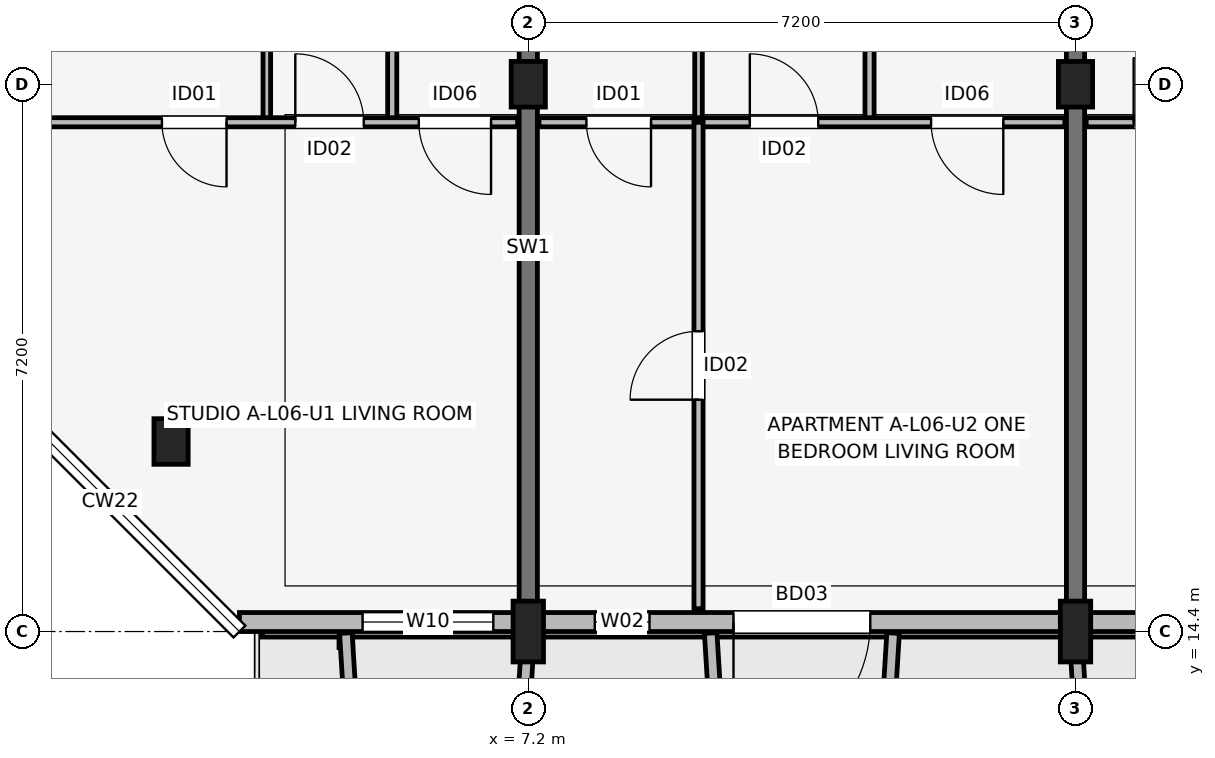
"""IFC4 building model, lengths in metres.
Left out: names, types, materials, properties, quantities, classifications, styles, units other than length and angle.
Written with IfcOpenShell. Run it as: python <this file> out.ifc"""

import sys

from ifc_helpers import new_model, si_unit, direction, frame, frame_2d, origin, origin_2d, place, context, subcontext, project, spatial, rectangle, extrude, element, fill, save


model = new_model("IFC4")
c1 = context("Model", 3, precision=1e-05, world=origin(), true_north=direction((0.0, 1.0)))
c2 = subcontext(c1, "Body", "Model", "MODEL_VIEW")
j1 = project(units=[si_unit("LENGTHUNIT", "METRE"), si_unit("PLANEANGLEUNIT", "RADIAN")], contexts=[c1])
p1 = place(None, origin())
s1 = spatial("IfcSite", under=j1, at=p1, CompositionType="ELEMENT")
p2 = place(p1, origin())
s2 = spatial("IfcBuilding", under=s1, at=p2, CompositionType="ELEMENT")
p3 = place(p2, frame((0.0, 0.0, 21.3)))
s3 = spatial("IfcBuildingStorey", under=s2, at=p3, CompositionType="ELEMENT", Elevation=21.3)
p4 = place(p3, frame((2.5, 16.9, 0.0), z_axis=(0.0, 0.0, 1.0), x_axis=(1.0, 0.0, 0.0)))
e1 = element("IfcColumn", 1, at=p4, inside=s3, PredefinedType="COLUMN", context=c2, shape_type="SweptSolid", body=[
    extrude(rectangle(XDim=0.45, YDim=0.6, at=origin_2d()), origin(), (0.0, 0.0, 1.0), 3.15),
])
p5 = place(p3, frame((7.2, 14.4, 0.0), z_axis=(0.0, 0.0, 1.0), x_axis=(1.0, 0.0, 0.0)))
e2 = element("IfcColumn", 2, at=p5, inside=s3, PredefinedType="COLUMN", context=c2, shape_type="SweptSolid", body=[
    extrude(rectangle(XDim=0.4, YDim=0.8, at=origin_2d()), origin(), (0.0, 0.0, 1.0), 3.15),
])
p6 = place(p3, frame((7.2, 21.6, 0.0), z_axis=(0.0, 0.0, 1.0), x_axis=(1.0, 0.0, 0.0)))
e3 = element("IfcColumn", 3, at=p6, inside=s3, PredefinedType="COLUMN", context=c2, shape_type="SweptSolid", body=[
    extrude(rectangle(XDim=0.45, YDim=0.6, at=origin_2d()), origin(), (0.0, 0.0, 1.0), 3.15),
])
p7 = place(p3, frame((14.4, 14.4, 0.0), z_axis=(0.0, 0.0, 1.0), x_axis=(1.0, 0.0, 0.0)))
e4 = element("IfcColumn", 4, at=p7, inside=s3, PredefinedType="COLUMN", context=c2, shape_type="SweptSolid", body=[
    extrude(rectangle(XDim=0.4, YDim=0.8, at=origin_2d()), origin(), (0.0, 0.0, 1.0), 3.15),
])
p8 = place(p3, frame((14.4, 21.6, 0.0), z_axis=(0.0, 0.0, 1.0), x_axis=(1.0, 0.0, 0.0)))
e5 = element("IfcColumn", 5, at=p8, inside=s3, PredefinedType="COLUMN", context=c2, shape_type="SweptSolid", body=[
    extrude(rectangle(XDim=0.45, YDim=0.6, at=origin_2d()), origin(), (0.0, 0.0, 1.0), 3.15),
])
for number, where, z_axis, x_axis in (
    (6, (7.2, 14.75, 0.0), (0.0, 0.0, 1.0), (0.0, 1.0, 0.0)),
    (7, (14.4, 14.75, 0.0), (0.0, 0.0, 1.0), (0.0, 1.0, 0.0)),
):
    element("IfcWall", number, at=place(p3, frame(where, z_axis=z_axis, x_axis=x_axis)), inside=s3, PredefinedType="SHEAR", context=c2, shape_type="SweptSolid", body=[
        extrude(rectangle(XDim=9.4, YDim=0.24, at=frame_2d((4.7, 0.0))), origin(), (0.0, 0.0, 1.0), 3.15),
    ])
p9 = place(p3, frame((3.4, 14.525, 0.0), z_axis=(0.0, 0.0, 1.0), x_axis=(1.0, 0.0, 0.0)))
e8 = element("IfcWall", 8, at=p9, inside=s3, PredefinedType="SOLIDWALL", context=c2, shape_type="SweptSolid", body=[
    extrude(rectangle(XDim=29.2, YDim=0.25, at=frame_2d((14.6, 0.0))), origin(), (0.0, 0.0, 1.0), 2.43),
])
p10 = place(p9, frame((8.3, 0.0, 0.0), z_axis=(0.0, 0.0, 1.0), x_axis=(-1.0, 0.0, 0.0)))
e9 = element("IfcOpeningElement", 9, at=p10, cuts=e8, PredefinedType="OPENING", context=c2, shape_type="SweptSolid", body=[
    extrude(rectangle(XDim=1.8, YDim=2.15, at=frame_2d((0.9, 1.075))), frame((0.0, 0.135, 0.0), z_axis=(0.0, -1.0, 0.0), x_axis=(1.0, 0.0, 0.0)), (0.0, 0.0, 1.0), 0.27),
])
p11 = place(p9, frame((22.625, 0.0, 0.0), z_axis=(0.0, 0.0, 1.0), x_axis=(-1.0, 0.0, 0.0)))
e10 = element("IfcOpeningElement", 10, at=p11, cuts=e8, PredefinedType="OPENING", context=c2, shape_type="SweptSolid", body=[
    extrude(rectangle(XDim=1.65, YDim=2.15, at=frame_2d((0.825, 1.075))), frame((0.0, 0.135, 0.0), z_axis=(0.0, -1.0, 0.0), x_axis=(1.0, 0.0, 0.0)), (0.0, 0.0, 1.0), 0.27),
])
p12 = place(p9, frame((1.62, 0.0, 0.7)))
e11 = element("IfcOpeningElement", 11, at=p12, cuts=e8, PredefinedType="OPENING", context=c2, shape_type="SweptSolid", body=[
    extrude(rectangle(XDim=1.72, YDim=1.6, at=frame_2d((0.86, 0.8))), frame((0.0, 0.135, 0.0), z_axis=(0.0, -1.0, 0.0), x_axis=(1.0, 0.0, 0.0)), (0.0, 0.0, 1.0), 0.27),
])
p13 = place(p9, frame((4.675, 0.0, 0.75)))
e12 = element("IfcOpeningElement", 12, at=p13, cuts=e8, PredefinedType="OPENING", context=c2, shape_type="SweptSolid", body=[
    extrude(rectangle(XDim=0.72, YDim=1.35, at=frame_2d((0.36, 0.675))), frame((0.0, 0.135, 0.0), z_axis=(0.0, -1.0, 0.0), x_axis=(1.0, 0.0, 0.0)), (0.0, 0.0, 1.0), 0.27),
])
p14 = place(p9, frame((13.6, 0.0, 0.67)))
e13 = element("IfcOpeningElement", 13, at=p14, cuts=e8, PredefinedType="OPENING", context=c2, shape_type="SweptSolid", body=[
    extrude(rectangle(XDim=2.0, YDim=1.65, at=frame_2d((1.0, 0.825))), frame((0.0, 0.135, 0.0), z_axis=(0.0, -1.0, 0.0), x_axis=(1.0, 0.0, 0.0)), (0.0, 0.0, 1.0), 0.27),
])
p15 = place(p9, frame((26.02, 0.0, 0.75)))
e14 = element("IfcOpeningElement", 14, at=p15, cuts=e8, PredefinedType="OPENING", context=c2, shape_type="SweptSolid", body=[
    extrude(rectangle(XDim=0.98, YDim=1.45, at=frame_2d((0.49, 0.725))), frame((0.0, 0.135, 0.0), z_axis=(0.0, -1.0, 0.0), x_axis=(1.0, 0.0, 0.0)), (0.0, 0.0, 1.0), 0.27),
])
for number, where, z_axis, x_axis in (
    (15, (4.8, 14.38, 0.0), (0.0, 0.0, 1.0), (0.061, -0.998, 0.0)),
    (16, (7.2, 14.38, 0.0), (0.0, 0.0, 1.0), (-0.061, -0.998, 0.0)),
):
    element("IfcWall", number, at=place(p3, frame(where, z_axis=z_axis, x_axis=x_axis)), inside=s3, PredefinedType="ELEMENTEDWALL", context=c2, shape_type="SweptSolid", body=[
        extrude(rectangle(XDim=1.964, YDim=0.165, at=frame_2d((0.982, 0.0))), origin(), (0.0, 0.0, 1.0), 2.95),
    ])
for number, where, z_axis, x_axis in (
    (17, (9.6, 14.38, 0.0), (0.0, 0.0, 1.0), (0.061, -0.998, 0.0)),
    (18, (12.0, 14.38, 0.0), (0.0, 0.0, 1.0), (-0.061, -0.998, 0.0)),
):
    element("IfcWall", number, at=place(p3, frame(where, z_axis=z_axis, x_axis=x_axis)), inside=s3, PredefinedType="ELEMENTEDWALL", context=c2, shape_type="SweptSolid", body=[
        extrude(rectangle(XDim=1.964, YDim=0.165, at=frame_2d((0.982, 0.0))), origin(), (0.0, 0.0, 1.0), 2.48),
    ])
p16 = place(p3, frame((14.4, 14.38, 0.0), z_axis=(0.0, 0.0, 1.0), x_axis=(0.061170732449, -0.998127317276, 0.0)))
e19 = element("IfcWall", 19, at=p16, inside=s3, PredefinedType="ELEMENTEDWALL", context=c2, shape_type="SweptSolid", body=[
    extrude(rectangle(XDim=1.964, YDim=0.165, at=frame_2d((0.982, 0.0))), origin(), (0.0, 0.0, 1.0), 2.53),
])
p17 = place(p3, frame((3.76, 21.1, 0.0), z_axis=(0.0, 0.0, 1.0), x_axis=(0.0, 1.0, 0.0)))
e20 = element("IfcWall", 20, at=p17, inside=s3, PredefinedType="PARTITIONING", context=c2, shape_type="SweptSolid", body=[
    extrude(rectangle(XDim=3.2, YDim=0.1, at=frame_2d((1.6, 0.0))), origin(), (0.0, 0.0, 1.0), 2.38),
])
p18 = place(p3, frame((5.41, 21.1, 0.0), z_axis=(0.0, 0.0, 1.0), x_axis=(0.0, 1.0, 0.0)))
e21 = element("IfcWall", 21, at=p18, inside=s3, PredefinedType="PARTITIONING", context=c2, shape_type="SweptSolid", body=[
    extrude(rectangle(XDim=3.2, YDim=0.12, at=frame_2d((1.6, 0.0))), origin(), (0.0, 0.0, 1.0), 2.38),
])
p19 = place(p3, frame((0.14, 21.1, 0.0), z_axis=(0.0, 0.0, 1.0), x_axis=(1.0, 0.0, 0.0)))
e22 = element("IfcWall", 22, at=p19, inside=s3, PredefinedType="PARTITIONING", context=c2, shape_type="SweptSolid", body=[
    extrude(rectangle(XDim=6.92, YDim=0.12, at=frame_2d((3.46, 0.0))), origin(), (0.0, 0.0, 1.0), 2.38),
])
p20 = place(p19, frame((3.09, 0.0, 0.0), z_axis=(0.0, 0.0, 1.0), x_axis=(-1.0, 0.0, 0.0)))
e23 = element("IfcOpeningElement", 23, at=p20, cuts=e22, PredefinedType="OPENING", context=c2, shape_type="SweptSolid", body=[
    extrude(rectangle(XDim=0.85, YDim=2.08, at=frame_2d((0.425, 1.04))), frame((0.0, 0.07, 0.0), z_axis=(0.0, -1.0, 0.0), x_axis=(1.0, 0.0, 0.0)), (0.0, 0.0, 1.0), 0.14),
])
p21 = place(p19, frame((3.995, 0.0, 0.0)))
e24 = element("IfcOpeningElement", 24, at=p21, cuts=e22, PredefinedType="OPENING", context=c2, shape_type="SweptSolid", body=[
    extrude(rectangle(XDim=0.9, YDim=2.08, at=frame_2d((0.45, 1.04))), frame((0.0, 0.07, 0.0), z_axis=(0.0, -1.0, 0.0), x_axis=(1.0, 0.0, 0.0)), (0.0, 0.0, 1.0), 0.14),
])
p22 = place(p19, frame((6.57, 0.0, 0.0), z_axis=(0.0, 0.0, 1.0), x_axis=(-1.0, 0.0, 0.0)))
e25 = element("IfcOpeningElement", 25, at=p22, cuts=e22, PredefinedType="OPENING", context=c2, shape_type="SweptSolid", body=[
    extrude(rectangle(XDim=0.95, YDim=2.08, at=frame_2d((0.475, 1.04))), frame((0.0, 0.07, 0.0), z_axis=(0.0, -1.0, 0.0), x_axis=(1.0, 0.0, 0.0)), (0.0, 0.0, 1.0), 0.14),
])
p23 = place(p3, frame((9.44, 21.1, 0.0), z_axis=(0.0, 0.0, 1.0), x_axis=(0.0, 1.0, 0.0)))
e26 = element("IfcWall", 26, at=p23, inside=s3, PredefinedType="PARTITIONING", context=c2, shape_type="SweptSolid", body=[
    extrude(rectangle(XDim=3.2, YDim=0.1, at=frame_2d((1.6, 0.0))), origin(), (0.0, 0.0, 1.0), 2.38),
])
p24 = place(p3, frame((11.69, 21.1, 0.0), z_axis=(0.0, 0.0, 1.0), x_axis=(0.0, 1.0, 0.0)))
e27 = element("IfcWall", 27, at=p24, inside=s3, PredefinedType="PARTITIONING", context=c2, shape_type="SweptSolid", body=[
    extrude(rectangle(XDim=3.2, YDim=0.12, at=frame_2d((1.6, 0.0))), origin(), (0.0, 0.0, 1.0), 2.38),
])
p25 = place(p3, frame((7.34, 21.1, 0.0), z_axis=(0.0, 0.0, 1.0), x_axis=(1.0, 0.0, 0.0)))
e28 = element("IfcWall", 28, at=p25, inside=s3, PredefinedType="PARTITIONING", context=c2, shape_type="SweptSolid", body=[
    extrude(rectangle(XDim=6.92, YDim=0.12, at=frame_2d((3.46, 0.0))), origin(), (0.0, 0.0, 1.0), 2.38),
])
p26 = place(p25, frame((1.475, 0.0, 0.0), z_axis=(0.0, 0.0, 1.0), x_axis=(-1.0, 0.0, 0.0)))
e29 = element("IfcOpeningElement", 29, at=p26, cuts=e28, PredefinedType="OPENING", context=c2, shape_type="SweptSolid", body=[
    extrude(rectangle(XDim=0.85, YDim=2.08, at=frame_2d((0.425, 1.04))), frame((0.0, 0.07, 0.0), z_axis=(0.0, -1.0, 0.0), x_axis=(1.0, 0.0, 0.0)), (0.0, 0.0, 1.0), 0.14),
])
p27 = place(p25, frame((2.775, 0.0, 0.0)))
e30 = element("IfcOpeningElement", 30, at=p27, cuts=e28, PredefinedType="OPENING", context=c2, shape_type="SweptSolid", body=[
    extrude(rectangle(XDim=0.9, YDim=2.08, at=frame_2d((0.45, 1.04))), frame((0.0, 0.07, 0.0), z_axis=(0.0, -1.0, 0.0), x_axis=(1.0, 0.0, 0.0)), (0.0, 0.0, 1.0), 0.14),
])
p28 = place(p25, frame((6.11, 0.0, 0.0), z_axis=(0.0, 0.0, 1.0), x_axis=(-1.0, 0.0, 0.0)))
e31 = element("IfcOpeningElement", 31, at=p28, cuts=e28, PredefinedType="OPENING", context=c2, shape_type="SweptSolid", body=[
    extrude(rectangle(XDim=0.95, YDim=2.08, at=frame_2d((0.475, 1.04))), frame((0.0, 0.07, 0.0), z_axis=(0.0, -1.0, 0.0), x_axis=(1.0, 0.0, 0.0)), (0.0, 0.0, 1.0), 0.14),
])
p29 = place(p3, frame((9.44, 14.7, 0.0), z_axis=(0.0, 0.0, 1.0), x_axis=(0.0, 1.0, 0.0)))
e32 = element("IfcWall", 32, at=p29, inside=s3, PredefinedType="PARTITIONING", context=c2, shape_type="SweptSolid", body=[
    extrude(rectangle(XDim=6.4, YDim=0.12, at=frame_2d((3.2, 0.0))), origin(), (0.0, 0.0, 1.0), 2.38),
])
p30 = place(p29, frame((2.75, 0.0, 0.0)))
e33 = element("IfcOpeningElement", 33, at=p30, cuts=e32, PredefinedType="OPENING", context=c2, shape_type="SweptSolid", body=[
    extrude(rectangle(XDim=0.9, YDim=2.08, at=frame_2d((0.45, 1.04))), frame((0.0, 0.07, 0.0), z_axis=(0.0, -1.0, 0.0), x_axis=(1.0, 0.0, 0.0)), (0.0, 0.0, 1.0), 0.14),
])
p31 = place(p3, frame((14.54, 21.1, 0.0), z_axis=(0.0, 0.0, 1.0), x_axis=(1.0, 0.0, 0.0)))
e34 = element("IfcWall", 34, at=p31, inside=s3, PredefinedType="PARTITIONING", context=c2, shape_type="SweptSolid", body=[
    extrude(rectangle(XDim=6.92, YDim=0.12, at=frame_2d((3.46, 0.0))), origin(), (0.0, 0.0, 1.0), 2.38),
])
p32 = place(p31, frame((0.625, 0.0, 0.0)))
e35 = element("IfcOpeningElement", 35, at=p32, cuts=e34, PredefinedType="OPENING", context=c2, shape_type="SweptSolid", body=[
    extrude(rectangle(XDim=0.85, YDim=2.08, at=frame_2d((0.425, 1.04))), frame((0.0, 0.07, 0.0), z_axis=(0.0, -1.0, 0.0), x_axis=(1.0, 0.0, 0.0)), (0.0, 0.0, 1.0), 0.14),
])
p33 = place(p31, frame((3.525, 0.0, 0.0), z_axis=(0.0, 0.0, 1.0), x_axis=(-1.0, 0.0, 0.0)))
e36 = element("IfcOpeningElement", 36, at=p33, cuts=e34, PredefinedType="OPENING", context=c2, shape_type="SweptSolid", body=[
    extrude(rectangle(XDim=0.9, YDim=2.08, at=frame_2d((0.45, 1.04))), frame((0.0, 0.07, 0.0), z_axis=(0.0, -1.0, 0.0), x_axis=(1.0, 0.0, 0.0)), (0.0, 0.0, 1.0), 0.14),
])
p34 = place(p31, frame((5.01, 0.0, 0.0)))
e37 = element("IfcOpeningElement", 37, at=p34, cuts=e34, PredefinedType="OPENING", context=c2, shape_type="SweptSolid", body=[
    extrude(rectangle(XDim=0.95, YDim=2.08, at=frame_2d((0.475, 1.04))), frame((0.0, 0.07, 0.0), z_axis=(0.0, -1.0, 0.0), x_axis=(1.0, 0.0, 0.0)), (0.0, 0.0, 1.0), 0.14),
])
p35 = place(p10, origin())
e38 = element("IfcDoor", 38, at=p35, inside=s3, OperationType="SINGLE_SWING_LEFT", PredefinedType="DOOR", context=c2, shape_type="SweptSolid", body=[
    extrude(rectangle(XDim=1.8, YDim=2.15, at=frame_2d((0.9, 1.075))), frame((0.0, 0.025, 0.0), z_axis=(0.0, -1.0, 0.0), x_axis=(1.0, 0.0, 0.0)), (0.0, 0.0, 1.0), 0.05),
])
fill(e9, e38)
p36 = place(p12, origin())
e39 = element("IfcWindow", 39, at=p36, inside=s3, PartitioningType="SINGLE_PANEL", PredefinedType="WINDOW", context=c2, shape_type="SweptSolid", body=[
    extrude(rectangle(XDim=1.72, YDim=1.6, at=frame_2d((0.86, 0.8))), frame((0.0, 0.03, 0.0), z_axis=(0.0, -1.0, 0.0), x_axis=(1.0, 0.0, 0.0)), (0.0, 0.0, 1.0), 0.06),
])
fill(e11, e39)
p37 = place(p13, origin())
e40 = element("IfcWindow", 40, at=p37, inside=s3, PartitioningType="SINGLE_PANEL", PredefinedType="WINDOW", context=c2, shape_type="SweptSolid", body=[
    extrude(rectangle(XDim=0.72, YDim=1.35, at=frame_2d((0.36, 0.675))), frame((0.0, 0.03, 0.0), z_axis=(0.0, -1.0, 0.0), x_axis=(1.0, 0.0, 0.0)), (0.0, 0.0, 1.0), 0.06),
])
fill(e12, e40)
p38 = place(p20, origin())
e41 = element("IfcDoor", 41, at=p38, inside=s3, OperationType="SINGLE_SWING_RIGHT", PredefinedType="DOOR", context=c2, shape_type="SweptSolid", body=[
    extrude(rectangle(XDim=0.85, YDim=2.08, at=frame_2d((0.425, 1.04))), frame((0.0, 0.025, 0.0), z_axis=(0.0, -1.0, 0.0), x_axis=(1.0, 0.0, 0.0)), (0.0, 0.0, 1.0), 0.05),
])
fill(e23, e41)
p39 = place(p21, origin())
e42 = element("IfcDoor", 42, at=p39, inside=s3, OperationType="SINGLE_SWING_LEFT", PredefinedType="DOOR", context=c2, shape_type="SweptSolid", body=[
    extrude(rectangle(XDim=0.9, YDim=2.08, at=frame_2d((0.45, 1.04))), frame((0.0, 0.025, 0.0), z_axis=(0.0, -1.0, 0.0), x_axis=(1.0, 0.0, 0.0)), (0.0, 0.0, 1.0), 0.05),
])
fill(e24, e42)
p40 = place(p22, origin())
e43 = element("IfcDoor", 43, at=p40, inside=s3, OperationType="SINGLE_SWING_RIGHT", PredefinedType="DOOR", context=c2, shape_type="SweptSolid", body=[
    extrude(rectangle(XDim=0.95, YDim=2.08, at=frame_2d((0.475, 1.04))), frame((0.0, 0.025, 0.0), z_axis=(0.0, -1.0, 0.0), x_axis=(1.0, 0.0, 0.0)), (0.0, 0.0, 1.0), 0.05),
])
fill(e25, e43)
p41 = place(p26, origin())
e44 = element("IfcDoor", 44, at=p41, inside=s3, OperationType="SINGLE_SWING_RIGHT", PredefinedType="DOOR", context=c2, shape_type="SweptSolid", body=[
    extrude(rectangle(XDim=0.85, YDim=2.08, at=frame_2d((0.425, 1.04))), frame((0.0, 0.025, 0.0), z_axis=(0.0, -1.0, 0.0), x_axis=(1.0, 0.0, 0.0)), (0.0, 0.0, 1.0), 0.05),
])
fill(e29, e44)
p42 = place(p27, origin())
e45 = element("IfcDoor", 45, at=p42, inside=s3, OperationType="SINGLE_SWING_LEFT", PredefinedType="DOOR", context=c2, shape_type="SweptSolid", body=[
    extrude(rectangle(XDim=0.9, YDim=2.08, at=frame_2d((0.45, 1.04))), frame((0.0, 0.025, 0.0), z_axis=(0.0, -1.0, 0.0), x_axis=(1.0, 0.0, 0.0)), (0.0, 0.0, 1.0), 0.05),
])
fill(e30, e45)
p43 = place(p28, origin())
e46 = element("IfcDoor", 46, at=p43, inside=s3, OperationType="SINGLE_SWING_RIGHT", PredefinedType="DOOR", context=c2, shape_type="SweptSolid", body=[
    extrude(rectangle(XDim=0.95, YDim=2.08, at=frame_2d((0.475, 1.04))), frame((0.0, 0.025, 0.0), z_axis=(0.0, -1.0, 0.0), x_axis=(1.0, 0.0, 0.0)), (0.0, 0.0, 1.0), 0.05),
])
fill(e31, e46)
p44 = place(p30, origin())
e47 = element("IfcDoor", 47, at=p44, inside=s3, OperationType="SINGLE_SWING_LEFT", PredefinedType="DOOR", context=c2, shape_type="SweptSolid", body=[
    extrude(rectangle(XDim=0.9, YDim=2.08, at=frame_2d((0.45, 1.04))), frame((0.0, 0.025, 0.0), z_axis=(0.0, -1.0, 0.0), x_axis=(1.0, 0.0, 0.0)), (0.0, 0.0, 1.0), 0.05),
])
fill(e33, e47)
p45 = place(p32, origin())
e48 = element("IfcDoor", 48, at=p45, inside=s3, OperationType="SINGLE_SWING_LEFT", PredefinedType="DOOR", context=c2, shape_type="SweptSolid", body=[
    extrude(rectangle(XDim=0.85, YDim=2.08, at=frame_2d((0.425, 1.04))), frame((0.0, 0.025, 0.0), z_axis=(0.0, -1.0, 0.0), x_axis=(1.0, 0.0, 0.0)), (0.0, 0.0, 1.0), 0.05),
])
fill(e35, e48)
save(model, sys.argv[1])
